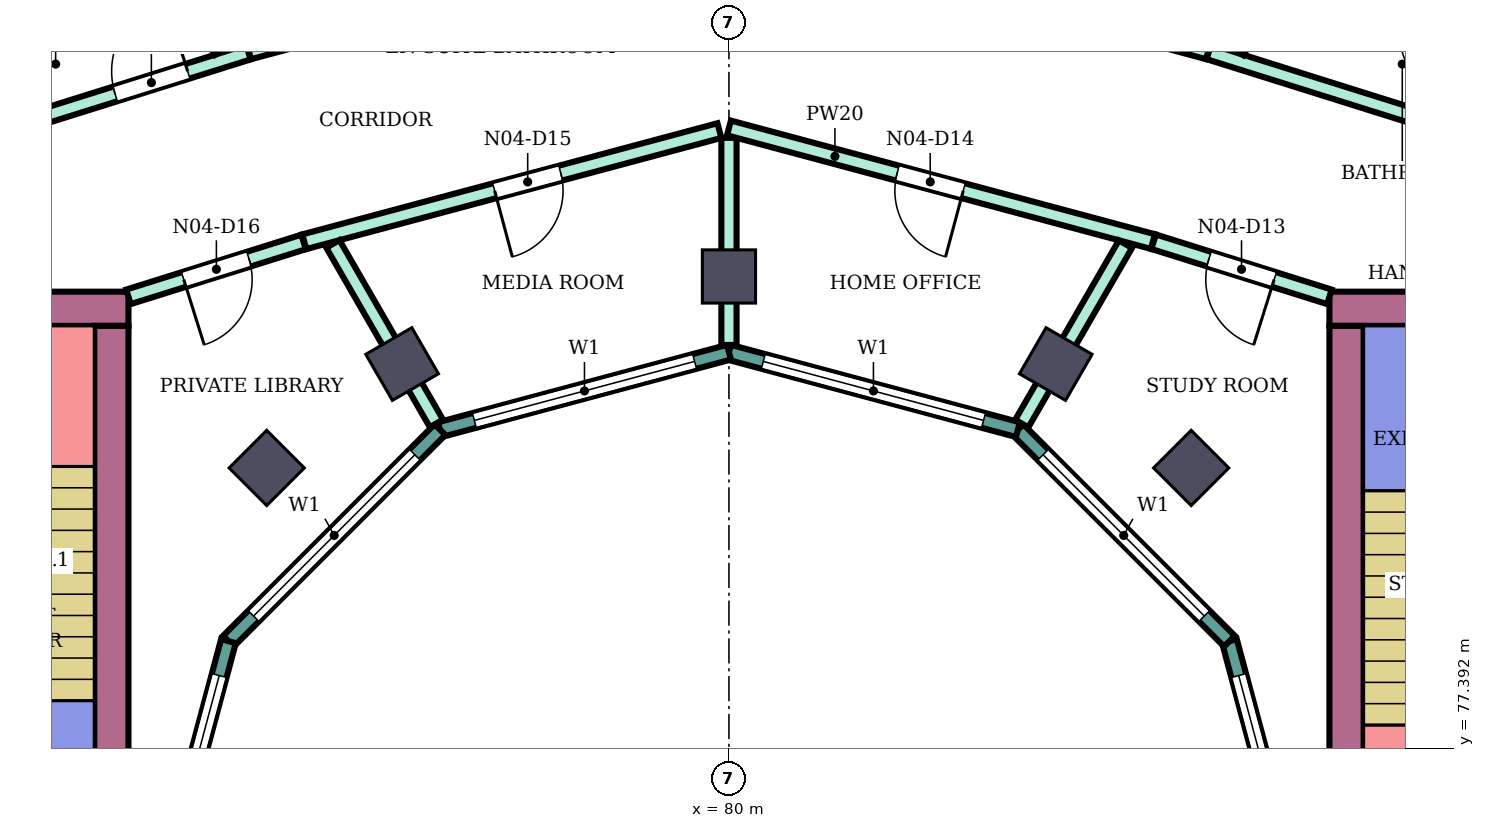
"""IFC4 building model, lengths in metres.
Left out: names, types, materials, properties, quantities, classifications, styles, units other than length and angle.
Written with IfcOpenShell. Run it as: python <this file> out.ifc"""

import sys

from ifc_helpers import new_model, si_unit, direction, frame, frame_2d, origin, origin_2d, place, context, subcontext, project, spatial, rectangle, extrude, element, fill, save


model = new_model("IFC4")
c1 = context("Model", 3, precision=1e-05, world=origin(), true_north=direction((0.0, 1.0)))
c2 = subcontext(c1, "Body", "Model", "MODEL_VIEW")
j1 = project(units=[si_unit("LENGTHUNIT", "METRE"), si_unit("PLANEANGLEUNIT", "RADIAN")], contexts=[c1])
p1 = place(None, origin())
s1 = spatial("IfcSite", under=j1, at=p1, CompositionType="ELEMENT")
p2 = place(p1, origin())
s2 = spatial("IfcBuilding", under=s1, at=p2, CompositionType="ELEMENT")
p3 = place(p2, frame((0.0, 0.0, 305.1)))
s3 = spatial("IfcBuildingStorey", under=s2, at=p3, CompositionType="ELEMENT", Elevation=305.1)
for number, where, z_axis, x_axis in (
    (1, (86.081, 81.081, 0.0), (0.0, 0.0, 1.0), (0.707, 0.707, 0.0)),
    (2, (84.3, 82.448, 0.0), (0.0, 0.0, 1.0), (0.5, 0.866, 0.0)),
    (3, (80.0, 83.6, 0.0), (0.0, 0.0, 1.0), (0.0, 1.0, 0.0)),
    (4, (75.7, 82.448, 0.0), (0.0, 0.0, 1.0), (-0.5, 0.866, 0.0)),
    (5, (73.919, 81.081, 0.0), (0.0, 0.0, 1.0), (-0.707, 0.707, 0.0)),
):
    element("IfcColumn", number, at=place(p3, frame(where, z_axis=z_axis, x_axis=x_axis)), inside=s3, PredefinedType="COLUMN", context=c2, shape_type="SweptSolid", body=[
        extrude(rectangle(XDim=0.7, YDim=0.7, at=origin_2d()), origin(), (0.0, 0.0, 1.0), 4.2),
    ])
p4 = place(p3, frame((87.9, 83.175, 0.0), z_axis=(0.0, 0.0, 1.0), x_axis=(1.0, 0.0, 0.0)))
e6 = element("IfcWall", 6, at=p4, inside=s3, PredefinedType="SHEAR", context=c2, shape_type="SweptSolid", body=[
    extrude(rectangle(XDim=12.0, YDim=0.45, at=frame_2d((6.0, 0.0))), origin(), (0.0, 0.0, 1.0), 3.85),
])
p5 = place(p4, frame((4.2, 0.0, 0.0)))
e7 = element("IfcOpeningElement", 7, at=p5, cuts=e6, PredefinedType="OPENING", context=c2, shape_type="SweptSolid", body=[
    extrude(rectangle(XDim=2.4, YDim=2.4, at=frame_2d((1.2, 1.2))), frame((0.0, 0.235, 0.0), z_axis=(0.0, -1.0, 0.0), x_axis=(1.0, 0.0, 0.0)), (0.0, 0.0, 1.0), 0.47),
])
p6 = place(p3, frame((88.125, 75.0, 0.0), z_axis=(0.0, 0.0, 1.0), x_axis=(0.0, 1.0, 0.0)))
e8 = element("IfcWall", 8, at=p6, inside=s3, PredefinedType="SHEAR", context=c2, shape_type="SweptSolid", body=[
    extrude(rectangle(XDim=7.95, YDim=0.45, at=frame_2d((3.975, 0.0))), origin(), (0.0, 0.0, 1.0), 3.85),
])
p7 = place(p3, frame((72.1, 83.175, 0.0), z_axis=(0.0, 0.0, 1.0), x_axis=(-1.0, 0.0, 0.0)))
e9 = element("IfcWall", 9, at=p7, inside=s3, PredefinedType="SHEAR", context=c2, shape_type="SweptSolid", body=[
    extrude(rectangle(XDim=12.0, YDim=0.45, at=frame_2d((6.0, 0.0))), origin(), (0.0, 0.0, 1.0), 3.85),
])
p8 = place(p7, frame((4.2, 0.0, 0.0)))
e10 = element("IfcOpeningElement", 10, at=p8, cuts=e9, PredefinedType="OPENING", context=c2, shape_type="SweptSolid", body=[
    extrude(rectangle(XDim=2.4, YDim=2.4, at=frame_2d((1.2, 1.2))), frame((0.0, 0.235, 0.0), z_axis=(0.0, -1.0, 0.0), x_axis=(1.0, 0.0, 0.0)), (0.0, 0.0, 1.0), 0.47),
])
p9 = place(p3, frame((71.875, 82.95, 0.0), z_axis=(0.0, 0.0, 1.0), x_axis=(0.0, -1.0, 0.0)))
e11 = element("IfcWall", 11, at=p9, inside=s3, PredefinedType="SHEAR", context=c2, shape_type="SweptSolid", body=[
    extrude(rectangle(XDim=7.95, YDim=0.45, at=frame_2d((3.975, 0.0))), origin(), (0.0, 0.0, 1.0), 3.85),
])
p10 = place(p3, frame((87.604, 75.0, 0.0), z_axis=(0.0, 0.0, 1.0), x_axis=(-0.258789828301, 0.965933654434, 0.0)))
e12 = element("IfcWall", 12, at=p10, inside=s3, PredefinedType="NOTDEFINED", context=c2, shape_type="SweptSolid", body=[
    extrude(rectangle(XDim=3.936, YDim=0.2, at=frame_2d((1.968, 0.0))), origin(), (0.0, 0.0, 1.0), 4.2),
])
p11 = place(p10, frame((0.468, 0.0, 0.9)))
e13 = element("IfcOpeningElement", 13, at=p11, cuts=e12, PredefinedType="OPENING", context=c2, shape_type="SweptSolid", body=[
    extrude(rectangle(XDim=3.0, YDim=2.3, at=frame_2d((1.5, 1.15))), frame((0.0, 0.11, 0.0), z_axis=(0.0, -1.0, 0.0), x_axis=(1.0, 0.0, 0.0)), (0.0, 0.0, 1.0), 0.22),
])
p12 = place(p3, frame((86.585, 78.802, 0.0), z_axis=(0.0, 0.0, 1.0), x_axis=(-0.707106781187, 0.707106781187, 0.0)))
e14 = element("IfcWall", 14, at=p12, inside=s3, PredefinedType="NOTDEFINED", context=c2, shape_type="SweptSolid", body=[
    extrude(rectangle(XDim=3.936, YDim=0.2, at=frame_2d((1.968, 0.0))), origin(), (0.0, 0.0, 1.0), 4.2),
])
p13 = place(p12, frame((0.468, 0.0, 0.9)))
e15 = element("IfcOpeningElement", 15, at=p13, cuts=e14, PredefinedType="OPENING", context=c2, shape_type="SweptSolid", body=[
    extrude(rectangle(XDim=3.0, YDim=2.3, at=frame_2d((1.5, 1.15))), frame((0.0, 0.11, 0.0), z_axis=(0.0, -1.0, 0.0), x_axis=(1.0, 0.0, 0.0)), (0.0, 0.0, 1.0), 0.22),
])
p14 = place(p3, frame((83.802, 81.585, 0.0), z_axis=(0.0, 0.0, 1.0), x_axis=(-0.965933654434, 0.258789828301, 0.0)))
e16 = element("IfcWall", 16, at=p14, inside=s3, PredefinedType="NOTDEFINED", context=c2, shape_type="SweptSolid", body=[
    extrude(rectangle(XDim=3.936, YDim=0.2, at=frame_2d((1.968, 0.0))), origin(), (0.0, 0.0, 1.0), 4.2),
])
p15 = place(p14, frame((0.468, 0.0, 0.9)))
e17 = element("IfcOpeningElement", 17, at=p15, cuts=e16, PredefinedType="OPENING", context=c2, shape_type="SweptSolid", body=[
    extrude(rectangle(XDim=3.0, YDim=2.3, at=frame_2d((1.5, 1.15))), frame((0.0, 0.11, 0.0), z_axis=(0.0, -1.0, 0.0), x_axis=(1.0, 0.0, 0.0)), (0.0, 0.0, 1.0), 0.22),
])
p16 = place(p3, frame((80.0, 82.604, 0.0), z_axis=(0.0, 0.0, 1.0), x_axis=(-0.965933654434, -0.258789828301, 0.0)))
e18 = element("IfcWall", 18, at=p16, inside=s3, PredefinedType="NOTDEFINED", context=c2, shape_type="SweptSolid", body=[
    extrude(rectangle(XDim=3.936, YDim=0.2, at=frame_2d((1.968, 0.0))), origin(), (0.0, 0.0, 1.0), 4.2),
])
p17 = place(p16, frame((0.468, 0.0, 0.9)))
e19 = element("IfcOpeningElement", 19, at=p17, cuts=e18, PredefinedType="OPENING", context=c2, shape_type="SweptSolid", body=[
    extrude(rectangle(XDim=3.0, YDim=2.3, at=frame_2d((1.5, 1.15))), frame((0.0, 0.11, 0.0), z_axis=(0.0, -1.0, 0.0), x_axis=(1.0, 0.0, 0.0)), (0.0, 0.0, 1.0), 0.22),
])
p18 = place(p3, frame((76.198, 81.585, 0.0), z_axis=(0.0, 0.0, 1.0), x_axis=(-0.707106781187, -0.707106781187, 0.0)))
e20 = element("IfcWall", 20, at=p18, inside=s3, PredefinedType="NOTDEFINED", context=c2, shape_type="SweptSolid", body=[
    extrude(rectangle(XDim=3.936, YDim=0.2, at=frame_2d((1.968, 0.0))), origin(), (0.0, 0.0, 1.0), 4.2),
])
p19 = place(p18, frame((0.468, 0.0, 0.9)))
e21 = element("IfcOpeningElement", 21, at=p19, cuts=e20, PredefinedType="OPENING", context=c2, shape_type="SweptSolid", body=[
    extrude(rectangle(XDim=3.0, YDim=2.3, at=frame_2d((1.5, 1.15))), frame((0.0, 0.11, 0.0), z_axis=(0.0, -1.0, 0.0), x_axis=(1.0, 0.0, 0.0)), (0.0, 0.0, 1.0), 0.22),
])
p20 = place(p3, frame((73.415, 78.802, 0.0), z_axis=(0.0, 0.0, 1.0), x_axis=(-0.258789828301, -0.965933654434, 0.0)))
e22 = element("IfcWall", 22, at=p20, inside=s3, PredefinedType="NOTDEFINED", context=c2, shape_type="SweptSolid", body=[
    extrude(rectangle(XDim=3.936, YDim=0.2, at=frame_2d((1.968, 0.0))), origin(), (0.0, 0.0, 1.0), 4.2),
])
p21 = place(p20, frame((0.468, 0.0, 0.9)))
e23 = element("IfcOpeningElement", 23, at=p21, cuts=e22, PredefinedType="OPENING", context=c2, shape_type="SweptSolid", body=[
    extrude(rectangle(XDim=3.0, YDim=2.3, at=frame_2d((1.5, 1.15))), frame((0.0, 0.11, 0.0), z_axis=(0.0, -1.0, 0.0), x_axis=(1.0, 0.0, 0.0)), (0.0, 0.0, 1.0), 0.22),
])
p22 = place(p3, frame((68.2, 84.833, 0.0), z_axis=(0.0, 0.0, 1.0), x_axis=(0.954191968402, 0.299195065863, 0.0)))
e24 = element("IfcWall", 24, at=p22, inside=s3, PredefinedType="PARTITIONING", context=c2, shape_type="SweptSolid", body=[
    extrude(rectangle(XDim=5.74, YDim=0.2, at=frame_2d((2.87, 0.0))), origin(), (0.0, 0.0, 1.0), 3.75),
])
p23 = place(p22, frame((3.903, 0.0, 0.0)))
e25 = element("IfcOpeningElement", 25, at=p23, cuts=e24, PredefinedType="OPENING", context=c2, shape_type="SweptSolid", body=[
    extrude(rectangle(XDim=1.0, YDim=2.1, at=frame_2d((0.5, 1.05))), frame((0.0, 0.11, 0.0), z_axis=(0.0, -1.0, 0.0), x_axis=(1.0, 0.0, 0.0)), (0.0, 0.0, 1.0), 0.22),
])
p24 = place(p3, frame((68.854, 94.312, 0.0), z_axis=(0.0, 0.0, 1.0), x_axis=(0.499901994742, -0.866081979753, 0.0)))
e26 = element("IfcWall", 26, at=p24, inside=s3, PredefinedType="PARTITIONING", context=c2, shape_type="SweptSolid", body=[
    extrude(rectangle(XDim=8.946, YDim=0.2, at=frame_2d((4.473, 0.0))), origin(), (0.0, 0.0, 1.0), 3.75),
])
p25 = place(p3, frame((72.1, 83.332, 0.0), z_axis=(0.0, 0.0, 1.0), x_axis=(0.954233106619, 0.299063836383, 0.0)))
e27 = element("IfcWall", 27, at=p25, inside=s3, PredefinedType="PARTITIONING", context=c2, shape_type="SweptSolid", body=[
    extrude(rectangle(XDim=2.414, YDim=0.2, at=frame_2d((1.207, 0.0))), origin(), (0.0, 0.0, 1.0), 3.75),
])
p26 = place(p25, frame((0.762, 0.0, 0.0)))
e28 = element("IfcOpeningElement", 28, at=p26, cuts=e27, PredefinedType="OPENING", context=c2, shape_type="SweptSolid", body=[
    extrude(rectangle(XDim=0.9, YDim=2.1, at=frame_2d((0.45, 1.05))), frame((0.0, 0.11, 0.0), z_axis=(0.0, -1.0, 0.0), x_axis=(1.0, 0.0, 0.0)), (0.0, 0.0, 1.0), 0.22),
])
p27 = place(p3, frame((73.687, 86.555, 0.0), z_axis=(0.0, 0.0, 1.0), x_axis=(0.966020868517, 0.258464081818, 0.0)))
e29 = element("IfcWall", 29, at=p27, inside=s3, PredefinedType="PARTITIONING", context=c2, shape_type="SweptSolid", body=[
    extrude(rectangle(XDim=6.446, YDim=0.2, at=frame_2d((3.223, 0.0))), origin(), (0.0, 0.0, 1.0), 3.75),
])
p28 = place(p27, frame((5.362, 0.0, 0.0)))
e30 = element("IfcOpeningElement", 30, at=p28, cuts=e29, PredefinedType="OPENING", context=c2, shape_type="SweptSolid", body=[
    extrude(rectangle(XDim=1.0, YDim=2.1, at=frame_2d((0.5, 1.05))), frame((0.0, 0.11, 0.0), z_axis=(0.0, -1.0, 0.0), x_axis=(1.0, 0.0, 0.0)), (0.0, 0.0, 1.0), 0.22),
])
p29 = place(p3, frame((74.413, 84.057, 0.0), z_axis=(0.0, 0.0, 1.0), x_axis=(0.965972135939, 0.258646153246, 0.0)))
e31 = element("IfcWall", 31, at=p29, inside=s3, PredefinedType="PARTITIONING", context=c2, shape_type="SweptSolid", body=[
    extrude(rectangle(XDim=5.654, YDim=0.2, at=frame_2d((2.827, 0.0))), origin(), (0.0, 0.0, 1.0), 3.75),
])
p30 = place(p29, frame((2.593, 0.0, 0.0)))
e32 = element("IfcOpeningElement", 32, at=p30, cuts=e31, PredefinedType="OPENING", context=c2, shape_type="SweptSolid", body=[
    extrude(rectangle(XDim=0.9, YDim=2.1, at=frame_2d((0.45, 1.05))), frame((0.0, 0.11, 0.0), z_axis=(0.0, -1.0, 0.0), x_axis=(1.0, 0.0, 0.0)), (0.0, 0.0, 1.0), 0.22),
])
p31 = place(p3, frame((74.789, 84.028, 0.0), z_axis=(0.0, 0.0, 1.0), x_axis=(0.499838769631, -0.866118470172, 0.0)))
e33 = element("IfcWall", 33, at=p31, inside=s3, PredefinedType="PARTITIONING", context=c2, shape_type="SweptSolid", body=[
    extrude(rectangle(XDim=2.726, YDim=0.2, at=frame_2d((1.363, 0.0))), origin(), (0.0, 0.0, 1.0), 3.75),
])
p32 = place(p3, frame((80.0, 82.699, 0.0), z_axis=(0.0, 0.0, 1.0), x_axis=(0.0, 1.0, 0.0)))
e34 = element("IfcWall", 34, at=p32, inside=s3, PredefinedType="PARTITIONING", context=c2, shape_type="SweptSolid", body=[
    extrude(rectangle(XDim=2.725, YDim=0.2, at=frame_2d((1.363, 0.0))), origin(), (0.0, 0.0, 1.0), 3.75),
])
p33 = place(p3, frame((80.0, 85.554, 0.0), z_axis=(0.0, 0.0, 1.0), x_axis=(0.965928989968, -0.258807237802, 0.0)))
e35 = element("IfcWall", 35, at=p33, inside=s3, PredefinedType="PARTITIONING", context=c2, shape_type="SweptSolid", body=[
    extrude(rectangle(XDim=5.774, YDim=0.2, at=frame_2d((2.887, 0.0))), origin(), (0.0, 0.0, 1.0), 3.75),
])
p34 = place(p33, frame((2.292, 0.0, 0.0)))
e36 = element("IfcOpeningElement", 36, at=p34, cuts=e35, PredefinedType="OPENING", context=c2, shape_type="SweptSolid", body=[
    extrude(rectangle(XDim=0.9, YDim=2.1, at=frame_2d((0.45, 1.05))), frame((0.0, 0.11, 0.0), z_axis=(0.0, -1.0, 0.0), x_axis=(1.0, 0.0, 0.0)), (0.0, 0.0, 1.0), 0.22),
])
p35 = place(p3, frame((80.0, 88.246, 0.0), z_axis=(0.0, 0.0, 1.0), x_axis=(0.965866355913, -0.25904088966, 0.0)))
e37 = element("IfcWall", 37, at=p35, inside=s3, PredefinedType="PARTITIONING", context=c2, shape_type="SweptSolid", body=[
    extrude(rectangle(XDim=6.526, YDim=0.2, at=frame_2d((3.263, 0.0))), origin(), (0.0, 0.0, 1.0), 3.75),
])
p36 = place(p35, frame((4.986, 0.0, 0.0)))
e38 = element("IfcOpeningElement", 38, at=p36, cuts=e37, PredefinedType="OPENING", context=c2, shape_type="SweptSolid", body=[
    extrude(rectangle(XDim=1.0, YDim=2.1, at=frame_2d((0.5, 1.05))), frame((0.0, 0.11, 0.0), z_axis=(0.0, -1.0, 0.0), x_axis=(1.0, 0.0, 0.0)), (0.0, 0.0, 1.0), 0.22),
])
p37 = place(p3, frame((83.853, 81.665, 0.0), z_axis=(0.0, 0.0, 1.0), x_axis=(0.50035818211, 0.865818508462, 0.0)))
e39 = element("IfcWall", 39, at=p37, inside=s3, PredefinedType="PARTITIONING", context=c2, shape_type="SweptSolid", body=[
    extrude(rectangle(XDim=2.726, YDim=0.2, at=frame_2d((1.363, 0.0))), origin(), (0.0, 0.0, 1.0), 3.75),
])
p38 = place(p3, frame((85.587, 84.057, 0.0), z_axis=(0.0, 0.0, 1.0), x_axis=(0.954239513179, -0.299043393987, 0.0)))
e40 = element("IfcWall", 40, at=p38, inside=s3, PredefinedType="PARTITIONING", context=c2, shape_type="SweptSolid", body=[
    extrude(rectangle(XDim=2.424, YDim=0.2, at=frame_2d((1.212, 0.0))), origin(), (0.0, 0.0, 1.0), 3.75),
])
p39 = place(p38, frame((0.762, 0.0, 0.0)))
e41 = element("IfcOpeningElement", 41, at=p39, cuts=e40, PredefinedType="OPENING", context=c2, shape_type="SweptSolid", body=[
    extrude(rectangle(XDim=0.9, YDim=2.1, at=frame_2d((0.45, 1.05))), frame((0.0, 0.11, 0.0), z_axis=(0.0, -1.0, 0.0), x_axis=(1.0, 0.0, 0.0)), (0.0, 0.0, 1.0), 0.22),
])
p40 = place(p3, frame((86.313, 86.554, 0.0), z_axis=(0.0, 0.0, 1.0), x_axis=(0.954081217458, -0.299548043717, 0.0)))
e42 = element("IfcWall", 42, at=p40, inside=s3, PredefinedType="PARTITIONING", context=c2, shape_type="SweptSolid", body=[
    extrude(rectangle(XDim=5.721, YDim=0.2, at=frame_2d((2.86, 0.0))), origin(), (0.0, 0.0, 1.0), 3.75),
])
p41 = place(p3, frame((86.681, 86.56, 0.0), z_axis=(0.0, 0.0, 1.0), x_axis=(0.500262593568, 0.865873742226, 0.0)))
e43 = element("IfcWall", 43, at=p41, inside=s3, PredefinedType="PARTITIONING", context=c2, shape_type="SweptSolid", body=[
    extrude(rectangle(XDim=8.946, YDim=0.2, at=frame_2d((4.473, 0.0))), origin(), (0.0, 0.0, 1.0), 3.75),
])
p42 = place(p3, frame((87.345, 87.488, 0.0), z_axis=(0.0, 0.0, 1.0), x_axis=(0.954151912322, -0.299322782647, 0.0)))
e44 = element("IfcWall", 44, at=p42, inside=s3, PredefinedType="PARTITIONING", context=c2, shape_type="SweptSolid", body=[
    extrude(rectangle(XDim=4.032, YDim=0.1, at=frame_2d((2.016, 0.0))), origin(), (0.0, 0.0, 1.0), 3.75),
])
p43 = place(p42, frame((1.591, 0.0, 0.0)))
e45 = element("IfcOpeningElement", 45, at=p43, cuts=e44, PredefinedType="OPENING", context=c2, shape_type="SweptSolid", body=[
    extrude(rectangle(XDim=0.8, YDim=2.1, at=frame_2d((0.4, 1.05))), frame((0.0, 0.06, 0.0), z_axis=(0.0, -1.0, 0.0), x_axis=(1.0, 0.0, 0.0)), (0.0, 0.0, 1.0), 0.12),
])
p44 = place(p11, origin())
e46 = element("IfcWindow", 46, at=p44, inside=s3, PartitioningType="SINGLE_PANEL", PredefinedType="WINDOW", context=c2, shape_type="SweptSolid", body=[
    extrude(rectangle(XDim=3.0, YDim=2.3, at=frame_2d((1.5, 1.15))), frame((0.0, 0.03, 0.0), z_axis=(0.0, -1.0, 0.0), x_axis=(1.0, 0.0, 0.0)), (0.0, 0.0, 1.0), 0.06),
])
fill(e13, e46)
p45 = place(p13, origin())
e47 = element("IfcWindow", 47, at=p45, inside=s3, PartitioningType="SINGLE_PANEL", PredefinedType="WINDOW", context=c2, shape_type="SweptSolid", body=[
    extrude(rectangle(XDim=3.0, YDim=2.3, at=frame_2d((1.5, 1.15))), frame((0.0, 0.03, 0.0), z_axis=(0.0, -1.0, 0.0), x_axis=(1.0, 0.0, 0.0)), (0.0, 0.0, 1.0), 0.06),
])
fill(e15, e47)
p46 = place(p15, origin())
e48 = element("IfcWindow", 48, at=p46, inside=s3, PartitioningType="SINGLE_PANEL", PredefinedType="WINDOW", context=c2, shape_type="SweptSolid", body=[
    extrude(rectangle(XDim=3.0, YDim=2.3, at=frame_2d((1.5, 1.15))), frame((0.0, 0.03, 0.0), z_axis=(0.0, -1.0, 0.0), x_axis=(1.0, 0.0, 0.0)), (0.0, 0.0, 1.0), 0.06),
])
fill(e17, e48)
p47 = place(p17, origin())
e49 = element("IfcWindow", 49, at=p47, inside=s3, PartitioningType="SINGLE_PANEL", PredefinedType="WINDOW", context=c2, shape_type="SweptSolid", body=[
    extrude(rectangle(XDim=3.0, YDim=2.3, at=frame_2d((1.5, 1.15))), frame((0.0, 0.03, 0.0), z_axis=(0.0, -1.0, 0.0), x_axis=(1.0, 0.0, 0.0)), (0.0, 0.0, 1.0), 0.06),
])
fill(e19, e49)
p48 = place(p19, origin())
e50 = element("IfcWindow", 50, at=p48, inside=s3, PartitioningType="SINGLE_PANEL", PredefinedType="WINDOW", context=c2, shape_type="SweptSolid", body=[
    extrude(rectangle(XDim=3.0, YDim=2.3, at=frame_2d((1.5, 1.15))), frame((0.0, 0.03, 0.0), z_axis=(0.0, -1.0, 0.0), x_axis=(1.0, 0.0, 0.0)), (0.0, 0.0, 1.0), 0.06),
])
fill(e21, e50)
p49 = place(p21, origin())
e51 = element("IfcWindow", 51, at=p49, inside=s3, PartitioningType="SINGLE_PANEL", PredefinedType="WINDOW", context=c2, shape_type="SweptSolid", body=[
    extrude(rectangle(XDim=3.0, YDim=2.3, at=frame_2d((1.5, 1.15))), frame((0.0, 0.03, 0.0), z_axis=(0.0, -1.0, 0.0), x_axis=(1.0, 0.0, 0.0)), (0.0, 0.0, 1.0), 0.06),
])
fill(e23, e51)
p50 = place(p23, origin())
e52 = element("IfcDoor", 52, at=p50, inside=s3, OperationType="SINGLE_SWING_RIGHT", PredefinedType="DOOR", context=c2, shape_type="SweptSolid", body=[
    extrude(rectangle(XDim=1.0, YDim=2.1, at=frame_2d((0.5, 1.05))), frame((0.0, 0.025, 0.0), z_axis=(0.0, -1.0, 0.0), x_axis=(1.0, 0.0, 0.0)), (0.0, 0.0, 1.0), 0.05),
])
fill(e25, e52)
p51 = place(p39, frame((0.9, 0.0, 0.0), z_axis=(0.0, 0.0, 1.0), x_axis=(-1.0, 0.0, 0.0)))
e53 = element("IfcDoor", 53, at=p51, inside=s3, OperationType="SINGLE_SWING_LEFT", PredefinedType="DOOR", context=c2, shape_type="SweptSolid", body=[
    extrude(rectangle(XDim=0.9, YDim=2.1, at=frame_2d((0.45, 1.05))), frame((0.0, 0.025, 0.0), z_axis=(0.0, -1.0, 0.0), x_axis=(1.0, 0.0, 0.0)), (0.0, 0.0, 1.0), 0.05),
])
fill(e41, e53)
p52 = place(p34, frame((0.9, 0.0, 0.0), z_axis=(0.0, 0.0, 1.0), x_axis=(-1.0, 0.0, 0.0)))
e54 = element("IfcDoor", 54, at=p52, inside=s3, OperationType="SINGLE_SWING_LEFT", PredefinedType="DOOR", context=c2, shape_type="SweptSolid", body=[
    extrude(rectangle(XDim=0.9, YDim=2.1, at=frame_2d((0.45, 1.05))), frame((0.0, 0.025, 0.0), z_axis=(0.0, -1.0, 0.0), x_axis=(1.0, 0.0, 0.0)), (0.0, 0.0, 1.0), 0.05),
])
fill(e36, e54)
p53 = place(p30, frame((0.9, 0.0, 0.0), z_axis=(0.0, 0.0, 1.0), x_axis=(-1.0, 0.0, 0.0)))
e55 = element("IfcDoor", 55, at=p53, inside=s3, OperationType="SINGLE_SWING_RIGHT", PredefinedType="DOOR", context=c2, shape_type="SweptSolid", body=[
    extrude(rectangle(XDim=0.9, YDim=2.1, at=frame_2d((0.45, 1.05))), frame((0.0, 0.025, 0.0), z_axis=(0.0, -1.0, 0.0), x_axis=(1.0, 0.0, 0.0)), (0.0, 0.0, 1.0), 0.05),
])
fill(e32, e55)
p54 = place(p26, frame((0.9, 0.0, 0.0), z_axis=(0.0, 0.0, 1.0), x_axis=(-1.0, 0.0, 0.0)))
e56 = element("IfcDoor", 56, at=p54, inside=s3, OperationType="SINGLE_SWING_RIGHT", PredefinedType="DOOR", context=c2, shape_type="SweptSolid", body=[
    extrude(rectangle(XDim=0.9, YDim=2.1, at=frame_2d((0.45, 1.05))), frame((0.0, 0.025, 0.0), z_axis=(0.0, -1.0, 0.0), x_axis=(1.0, 0.0, 0.0)), (0.0, 0.0, 1.0), 0.05),
])
fill(e28, e56)
save(model, sys.argv[1])
